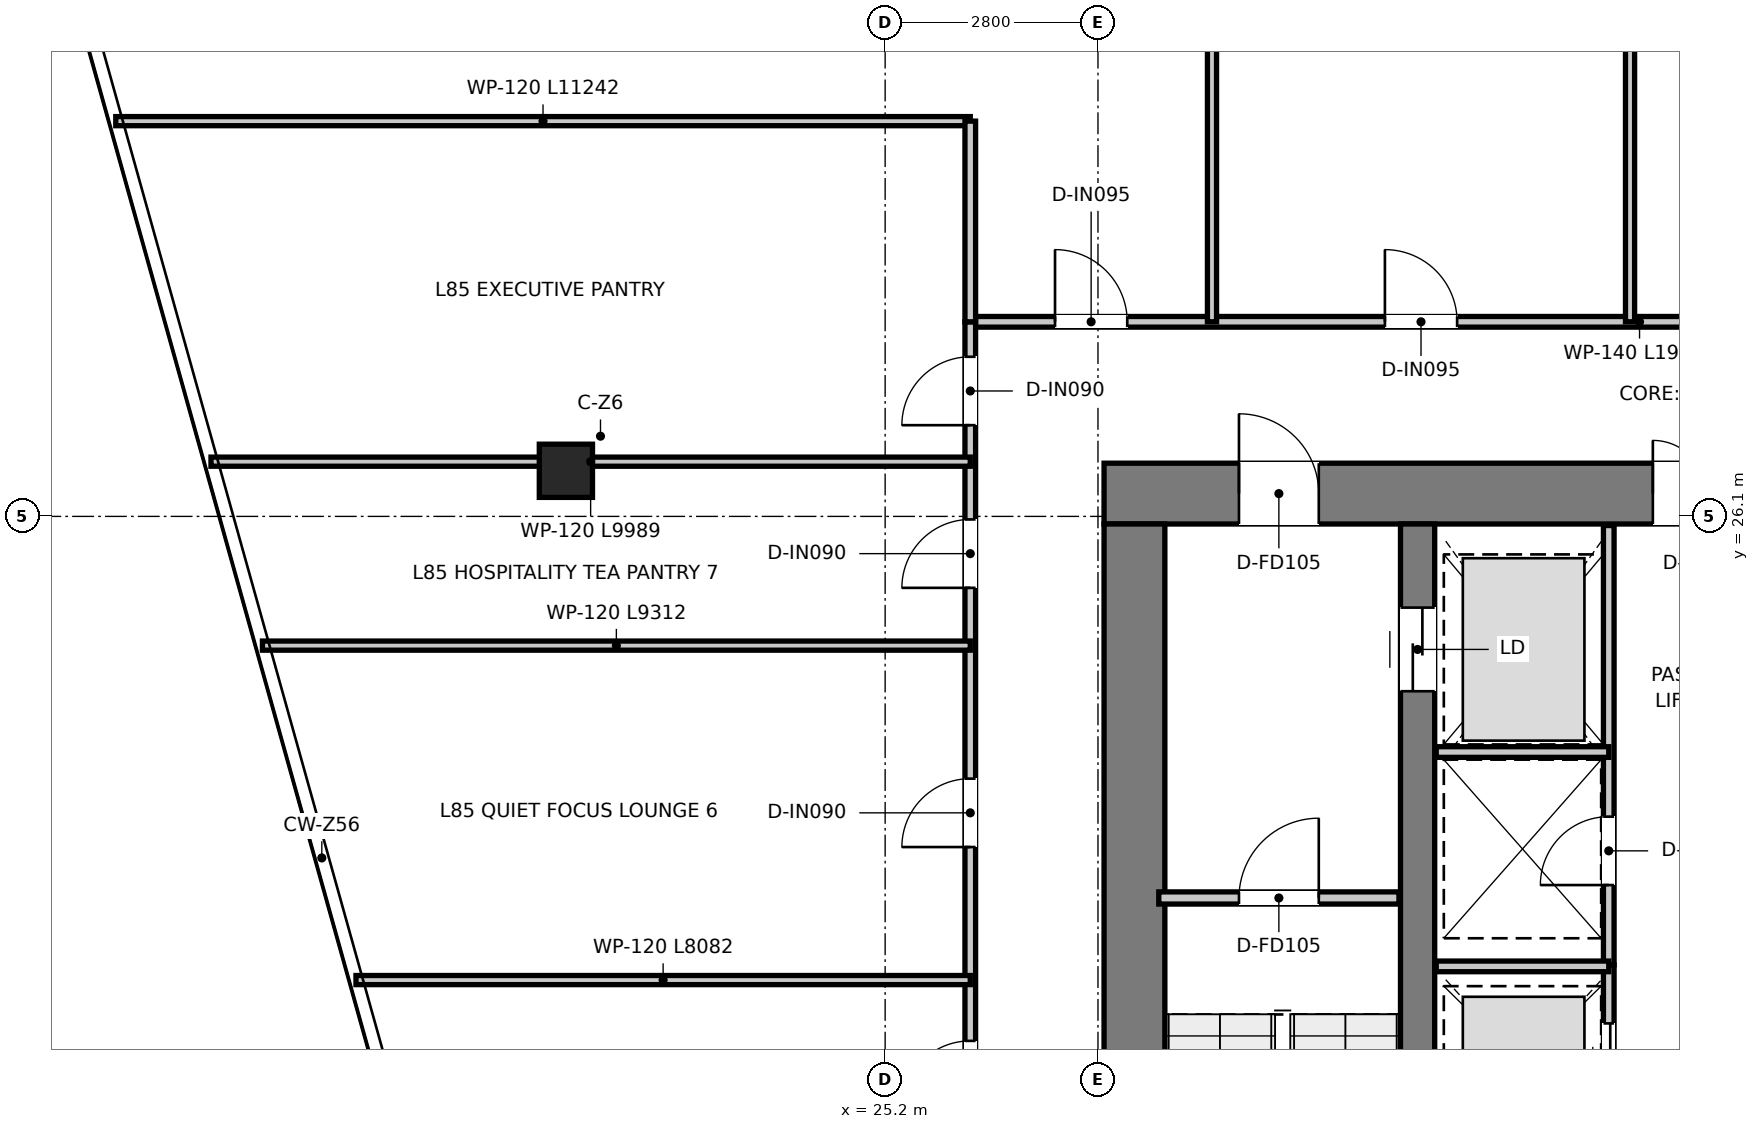
"""IFC4 building model, lengths in metres.
Left out: names, types, materials, properties, quantities, classifications, styles, units other than length and angle.
Written with IfcOpenShell. Run it as: python <this file> out.ifc"""

import sys

from ifc_helpers import new_model, si_unit, direction, frame, frame_2d, origin, origin_2d, place, context, subcontext, project, spatial, rectangle, extrude, source, transform, mapped, element, fill, save


model = new_model("IFC4")
c1 = context("Model", 3, precision=1e-05, world=origin(), true_north=direction((0.0, 1.0)))
c2 = subcontext(c1, "Body", "Model", "MODEL_VIEW")
j1 = project(units=[si_unit("LENGTHUNIT", "METRE"), si_unit("PLANEANGLEUNIT", "RADIAN")], contexts=[c1])
p1 = place(None, origin())
s1 = spatial("IfcSite", under=j1, at=p1, CompositionType="ELEMENT")
p2 = place(p1, origin())
s2 = spatial("IfcBuilding", under=s1, at=p2, CompositionType="ELEMENT")
p3 = place(p2, frame((0.0, 0.0, 347.45)))
s3 = spatial("IfcBuildingStorey", under=s2, at=p3, CompositionType="ELEMENT", Elevation=347.45)
p4 = place(p3, frame((28.08, 26.4, 0.0), z_axis=(0.0, 0.0, 1.0), x_axis=(1.0, 0.0, 0.0)))
e1 = element("IfcWall", 1, at=p4, inside=s3, PredefinedType="SHEAR", context=c2, shape_type="SweptSolid", body=[
    extrude(rectangle(XDim=15.84, YDim=0.8, at=frame_2d((7.92, 0.0))), origin(), (0.0, 0.0, 1.0), 3.95),
])
p5 = place(p4, frame((7.22, 0.0, 0.0)))
e2 = element("IfcOpeningElement", 2, at=p5, cuts=e1, PredefinedType="OPENING", context=c2, shape_type="SweptSolid", body=[
    extrude(rectangle(XDim=1.4, YDim=2.2, at=frame_2d((0.7, 1.1))), frame((0.0, 0.41, 0.0), z_axis=(0.0, -1.0, 0.0), x_axis=(1.0, 0.0, 0.0)), (0.0, 0.0, 1.0), 0.82),
])
p6 = place(p4, frame((1.775, 0.0, 0.0)))
e3 = element("IfcOpeningElement", 3, at=p6, cuts=e1, PredefinedType="OPENING", context=c2, shape_type="SweptSolid", body=[
    extrude(rectangle(XDim=1.05, YDim=2.1, at=frame_2d((0.525, 1.05))), frame((0.0, 0.41, 0.0), z_axis=(0.0, -1.0, 0.0), x_axis=(1.0, 0.0, 0.0)), (0.0, 0.0, 1.0), 0.82),
])
p7 = place(p4, frame((13.015, 0.0, 0.0)))
e4 = element("IfcOpeningElement", 4, at=p7, cuts=e1, PredefinedType="OPENING", context=c2, shape_type="SweptSolid", body=[
    extrude(rectangle(XDim=1.05, YDim=2.1, at=frame_2d((0.525, 1.05))), frame((0.0, 0.41, 0.0), z_axis=(0.0, -1.0, 0.0), x_axis=(1.0, 0.0, 0.0)), (0.0, 0.0, 1.0), 0.82),
])
p8 = place(p3, frame((28.48, 11.3, 0.0), z_axis=(0.0, 0.0, 1.0), x_axis=(0.0, 1.0, 0.0)))
e5 = element("IfcWall", 5, at=p8, inside=s3, PredefinedType="SHEAR", context=c2, shape_type="SweptSolid", body=[
    extrude(rectangle(XDim=14.7, YDim=0.8, at=frame_2d((7.35, 0.0))), origin(), (0.0, 0.0, 1.0), 3.95),
])
p9 = place(p3, frame((32.205, 13.22, 0.0), z_axis=(0.0, 0.0, 1.0), x_axis=(0.0, 1.0, 0.0)))
e6 = element("IfcWall", 6, at=p9, inside=s3, PredefinedType="SHEAR", context=c2, shape_type="SweptSolid", body=[
    extrude(rectangle(XDim=12.78, YDim=0.45, at=frame_2d((6.39, 0.0))), origin(), (0.0, 0.0, 1.0), 3.95),
])
p10 = place(p9, frame((10.58, 0.0, 0.0)))
e7 = element("IfcOpeningElement", 7, at=p10, cuts=e6, PredefinedType="OPENING", context=c2, shape_type="SweptSolid", body=[
    extrude(rectangle(XDim=1.1, YDim=2.15, at=frame_2d((0.55, 1.075))), frame((0.0, 0.235, 0.0), z_axis=(0.0, -1.0, 0.0), x_axis=(1.0, 0.0, 0.0)), (0.0, 0.0, 1.0), 0.47),
])
m1 = source(origin(), c2, "Body", "SweptSolid", [
    extrude(rectangle(XDim=0.7, YDim=0.7, at=origin_2d()), origin(), (0.0, 0.0, 1.0), 3.95),
])
p11 = place(p3, frame((21.0, 26.7, 0.0), z_axis=(0.0, 0.0, 1.0), x_axis=(1.0, 0.0, 0.0)))
e8 = element("IfcColumn", 8, at=p11, inside=s3, PredefinedType="COLUMN", context=c2, shape_type="MappedRepresentation", body=[
    mapped(m1, transform((0.0, 0.0, 0.0), x_axis=(1.0, 0.0, 0.0), y_axis=(0.0, 1.0, 0.0), z_axis=(0.0, 0.0, 1.0), scale=1.0)),
])
p12 = place(p3, frame((28.8, 21.08, 0.0), z_axis=(0.0, 0.0, 1.0), x_axis=(1.0, 0.0, 0.0)))
e9 = element("IfcWall", 9, at=p12, inside=s3, PredefinedType="PARTITIONING", context=c2, shape_type="SweptSolid", body=[
    extrude(rectangle(XDim=3.16, YDim=0.16, at=frame_2d((1.58, 0.0))), origin(), (0.0, 0.0, 1.0), 3.67),
])
p13 = place(p12, frame((1.055, 0.0, 0.0)))
e10 = element("IfcOpeningElement", 10, at=p13, cuts=e9, PredefinedType="OPENING", context=c2, shape_type="SweptSolid", body=[
    extrude(rectangle(XDim=1.05, YDim=2.1, at=frame_2d((0.525, 1.05))), frame((0.0, 0.09, 0.0), z_axis=(0.0, -1.0, 0.0), x_axis=(1.0, 0.0, 0.0)), (0.0, 0.0, 1.0), 0.18),
])
p14 = place(p3, frame((34.72, 20.2, 0.0), z_axis=(0.0, 0.0, 1.0), x_axis=(0.0, 1.0, 0.0)))
e11 = element("IfcWall", 11, at=p14, inside=s3, PredefinedType="PARTITIONING", context=c2, shape_type="SweptSolid", body=[
    extrude(rectangle(XDim=5.78, YDim=0.14, at=frame_2d((2.89, 0.0))), origin(), (0.0, 0.0, 1.0), 2.82),
])
p15 = place(p14, frame((1.05, 0.0, 0.0)))
e12 = element("IfcOpeningElement", 12, at=p15, cuts=e11, PredefinedType="OPENING", context=c2, shape_type="SweptSolid", body=[
    extrude(rectangle(XDim=0.9, YDim=2.1, at=frame_2d((0.45, 1.05))), frame((0.0, 0.08, 0.0), z_axis=(0.0, -1.0, 0.0), x_axis=(1.0, 0.0, 0.0)), (0.0, 0.0, 1.0), 0.16),
])
p16 = place(p3, frame((32.45, 23.0, 0.0), z_axis=(0.0, 0.0, 1.0), x_axis=(1.0, 0.0, 0.0)))
e13 = element("IfcWall", 13, at=p16, inside=s3, PredefinedType="PARTITIONING", context=c2, shape_type="SweptSolid", body=[
    extrude(rectangle(XDim=2.27, YDim=0.14, at=frame_2d((1.135, 0.0))), origin(), (0.0, 0.0, 1.0), 2.82),
])
p17 = place(p3, frame((34.72, 17.78, 0.0), z_axis=(0.0, 0.0, 1.0), x_axis=(0.0, 1.0, 0.0)))
e14 = element("IfcWall", 14, at=p17, inside=s3, PredefinedType="PARTITIONING", context=c2, shape_type="SweptSolid", body=[
    extrude(rectangle(XDim=2.42, YDim=0.14, at=frame_2d((1.21, 0.0))), origin(), (0.0, 0.0, 1.0), 3.67),
])
p18 = place(p17, frame((0.55, 0.0, 0.0)))
e15 = element("IfcOpeningElement", 15, at=p18, cuts=e14, PredefinedType="OPENING", context=c2, shape_type="SweptSolid", body=[
    extrude(rectangle(XDim=1.1, YDim=2.15, at=frame_2d((0.55, 1.075))), frame((0.0, 0.08, 0.0), z_axis=(0.0, -1.0, 0.0), x_axis=(1.0, 0.0, 0.0)), (0.0, 0.0, 1.0), 0.16),
])
p19 = place(p3, frame((32.45, 20.18, 0.0), z_axis=(0.0, 0.0, 1.0), x_axis=(1.0, 0.0, 0.0)))
e16 = element("IfcWall", 16, at=p19, inside=s3, PredefinedType="PARTITIONING", context=c2, shape_type="SweptSolid", body=[
    extrude(rectangle(XDim=2.27, YDim=0.14, at=frame_2d((1.135, 0.0))), origin(), (0.0, 0.0, 1.0), 3.67),
])
p20 = place(p3, frame((26.32, 28.66, 0.0), z_axis=(0.0, 0.0, 1.0), x_axis=(1.0, 0.0, 0.0)))
e17 = element("IfcWall", 17, at=p20, inside=s3, PredefinedType="PARTITIONING", context=c2, shape_type="SweptSolid", body=[
    extrude(rectangle(XDim=19.36, YDim=0.14, at=frame_2d((9.68, 0.0))), origin(), (0.0, 0.0, 1.0), 3.18),
])
p21 = place(p20, frame((1.115, 0.0, 0.0)))
e18 = element("IfcOpeningElement", 18, at=p21, cuts=e17, PredefinedType="OPENING", context=c2, shape_type="SweptSolid", body=[
    extrude(rectangle(XDim=0.95, YDim=2.1, at=frame_2d((0.475, 1.05))), frame((0.0, 0.08, 0.0), z_axis=(0.0, -1.0, 0.0), x_axis=(1.0, 0.0, 0.0)), (0.0, 0.0, 1.0), 0.16),
])
p22 = place(p20, frame((5.455, 0.0, 0.0)))
e19 = element("IfcOpeningElement", 19, at=p22, cuts=e17, PredefinedType="OPENING", context=c2, shape_type="SweptSolid", body=[
    extrude(rectangle(XDim=0.95, YDim=2.1, at=frame_2d((0.475, 1.05))), frame((0.0, 0.08, 0.0), z_axis=(0.0, -1.0, 0.0), x_axis=(1.0, 0.0, 0.0)), (0.0, 0.0, 1.0), 0.16),
])
p23 = place(p20, frame((11.205, 0.0, 0.0)))
e20 = element("IfcOpeningElement", 20, at=p23, cuts=e17, PredefinedType="OPENING", context=c2, shape_type="SweptSolid", body=[
    extrude(rectangle(XDim=0.95, YDim=2.1, at=frame_2d((0.475, 1.05))), frame((0.0, 0.08, 0.0), z_axis=(0.0, -1.0, 0.0), x_axis=(1.0, 0.0, 0.0)), (0.0, 0.0, 1.0), 0.16),
])
p24 = place(p20, frame((16.545, 0.0, 0.0)))
e21 = element("IfcOpeningElement", 21, at=p24, cuts=e17, PredefinedType="OPENING", context=c2, shape_type="SweptSolid", body=[
    extrude(rectangle(XDim=0.95, YDim=2.1, at=frame_2d((0.475, 1.05))), frame((0.0, 0.08, 0.0), z_axis=(0.0, -1.0, 0.0), x_axis=(1.0, 0.0, 0.0)), (0.0, 0.0, 1.0), 0.16),
])
p25 = place(p3, frame((26.32, 13.0, 0.0), z_axis=(0.0, 0.0, 1.0), x_axis=(0.0, 1.0, 0.0)))
e22 = element("IfcWall", 22, at=p25, inside=s3, PredefinedType="PARTITIONING", context=c2, shape_type="SweptSolid", body=[
    extrude(rectangle(XDim=15.66, YDim=0.14, at=frame_2d((7.83, 0.0))), origin(), (0.0, 0.0, 1.0), 3.13),
])
p26 = place(p25, frame((14.3, 0.0, 0.0)))
e23 = element("IfcOpeningElement", 23, at=p26, cuts=e22, PredefinedType="OPENING", context=c2, shape_type="SweptSolid", body=[
    extrude(rectangle(XDim=0.9, YDim=2.1, at=frame_2d((0.45, 1.05))), frame((0.0, 0.08, 0.0), z_axis=(0.0, -1.0, 0.0), x_axis=(1.0, 0.0, 0.0)), (0.0, 0.0, 1.0), 0.16),
])
p27 = place(p25, frame((5.3, 0.0, 0.0)))
e24 = element("IfcOpeningElement", 24, at=p27, cuts=e22, PredefinedType="OPENING", context=c2, shape_type="SweptSolid", body=[
    extrude(rectangle(XDim=0.9, YDim=2.1, at=frame_2d((0.45, 1.05))), frame((0.0, 0.08, 0.0), z_axis=(0.0, -1.0, 0.0), x_axis=(1.0, 0.0, 0.0)), (0.0, 0.0, 1.0), 0.16),
])
p28 = place(p25, frame((8.75, 0.0, 0.0)))
e25 = element("IfcOpeningElement", 25, at=p28, cuts=e22, PredefinedType="OPENING", context=c2, shape_type="SweptSolid", body=[
    extrude(rectangle(XDim=0.9, YDim=2.1, at=frame_2d((0.45, 1.05))), frame((0.0, 0.08, 0.0), z_axis=(0.0, -1.0, 0.0), x_axis=(1.0, 0.0, 0.0)), (0.0, 0.0, 1.0), 0.16),
])
p29 = place(p25, frame((12.16, 0.0, 0.0)))
e26 = element("IfcOpeningElement", 26, at=p29, cuts=e22, PredefinedType="OPENING", context=c2, shape_type="SweptSolid", body=[
    extrude(rectangle(XDim=0.9, YDim=2.1, at=frame_2d((0.45, 1.05))), frame((0.0, 0.08, 0.0), z_axis=(0.0, -1.0, 0.0), x_axis=(1.0, 0.0, 0.0)), (0.0, 0.0, 1.0), 0.16),
])
p30 = place(p3, frame((16.331, 26.82, 0.0), z_axis=(0.0, 0.0, 1.0), x_axis=(1.0, 0.0, 0.0)))
e27 = element("IfcWall", 27, at=p30, inside=s3, PredefinedType="PARTITIONING", context=c2, shape_type="SweptSolid", body=[
    extrude(rectangle(XDim=9.989, YDim=0.12, at=frame_2d((4.995, 0.0))), origin(), (0.0, 0.0, 1.0), 3.13),
])
p31 = place(p3, frame((15.078, 31.3, 0.0), z_axis=(0.0, 0.0, 1.0), x_axis=(1.0, 0.0, 0.0)))
e28 = element("IfcWall", 28, at=p31, inside=s3, PredefinedType="PARTITIONING", context=c2, shape_type="SweptSolid", body=[
    extrude(rectangle(XDim=11.242, YDim=0.12, at=frame_2d((5.621, 0.0))), origin(), (0.0, 0.0, 1.0), 3.13),
])
p32 = place(p3, frame((26.32, 28.66, 0.0), z_axis=(0.0, 0.0, 1.0), x_axis=(0.0, 1.0, 0.0)))
e29 = element("IfcWall", 29, at=p32, inside=s3, PredefinedType="PARTITIONING", context=c2, shape_type="SweptSolid", body=[
    extrude(rectangle(XDim=2.64, YDim=0.14, at=frame_2d((1.32, 0.0))), origin(), (0.0, 0.0, 1.0), 3.43),
])
p33 = place(p3, frame((29.5, 28.66, 0.0), z_axis=(0.0, 0.0, 1.0), x_axis=(0.0, 1.0, 0.0)))
e30 = element("IfcWall", 30, at=p33, inside=s3, PredefinedType="PARTITIONING", context=c2, shape_type="SweptSolid", body=[
    extrude(rectangle(XDim=15.858, YDim=0.12, at=frame_2d((7.929, 0.0))), origin(), (0.0, 0.0, 1.0), 3.13),
])
p34 = place(p3, frame((35.0, 28.66, 0.0), z_axis=(0.0, 0.0, 1.0), x_axis=(0.0, 1.0, 0.0)))
e31 = element("IfcWall", 31, at=p34, inside=s3, PredefinedType="PARTITIONING", context=c2, shape_type="SweptSolid", body=[
    extrude(rectangle(XDim=17.396, YDim=0.12, at=frame_2d((8.698, 0.0))), origin(), (0.0, 0.0, 1.0), 3.13),
])
p35 = place(p3, frame((18.238, 20.0, 0.0), z_axis=(0.0, 0.0, 1.0), x_axis=(1.0, 0.0, 0.0)))
e32 = element("IfcWall", 32, at=p35, inside=s3, PredefinedType="PARTITIONING", context=c2, shape_type="SweptSolid", body=[
    extrude(rectangle(XDim=8.082, YDim=0.12, at=frame_2d((4.041, 0.0))), origin(), (0.0, 0.0, 1.0), 3.13),
])
p36 = place(p3, frame((17.008, 24.4, 0.0), z_axis=(0.0, 0.0, 1.0), x_axis=(1.0, 0.0, 0.0)))
e33 = element("IfcWall", 33, at=p36, inside=s3, PredefinedType="PARTITIONING", context=c2, shape_type="SweptSolid", body=[
    extrude(rectangle(XDim=9.312, YDim=0.12, at=frame_2d((4.656, 0.0))), origin(), (0.0, 0.0, 1.0), 3.13),
])
p37 = place(p13, origin())
e34 = element("IfcDoor", 34, at=p37, inside=s3, OperationType="SINGLE_SWING_RIGHT", PredefinedType="DOOR", context=c2, shape_type="SweptSolid", body=[
    extrude(rectangle(XDim=1.05, YDim=2.1, at=frame_2d((0.525, 1.05))), frame((0.0, 0.025, 0.0), z_axis=(0.0, -1.0, 0.0), x_axis=(1.0, 0.0, 0.0)), (0.0, 0.0, 1.0), 0.05),
])
fill(e10, e34)
p38 = place(p5, origin())
e35 = element("IfcDoor", 35, at=p38, inside=s3, OperationType="DOUBLE_DOOR_SINGLE_SWING", PredefinedType="DOOR", context=c2, shape_type="SweptSolid", body=[
    extrude(rectangle(XDim=1.4, YDim=2.2, at=frame_2d((0.7, 1.1))), frame((0.0, 0.025, 0.0), z_axis=(0.0, -1.0, 0.0), x_axis=(1.0, 0.0, 0.0)), (0.0, 0.0, 1.0), 0.05),
])
fill(e2, e35)
p39 = place(p6, origin())
e36 = element("IfcDoor", 36, at=p39, inside=s3, OperationType="SINGLE_SWING_LEFT", PredefinedType="DOOR", context=c2, shape_type="SweptSolid", body=[
    extrude(rectangle(XDim=1.05, YDim=2.1, at=frame_2d((0.525, 1.05))), frame((0.0, 0.025, 0.0), z_axis=(0.0, -1.0, 0.0), x_axis=(1.0, 0.0, 0.0)), (0.0, 0.0, 1.0), 0.05),
])
fill(e3, e36)
p40 = place(p10, origin())
e37 = element("IfcDoor", 37, at=p40, inside=s3, OperationType="DOUBLE_DOOR_SLIDING", PredefinedType="DOOR", context=c2, shape_type="SweptSolid", body=[
    extrude(rectangle(XDim=1.1, YDim=2.15, at=frame_2d((0.55, 1.075))), frame((0.0, 0.025, 0.0), z_axis=(0.0, -1.0, 0.0), x_axis=(1.0, 0.0, 0.0)), (0.0, 0.0, 1.0), 0.05),
])
fill(e7, e37)
p41 = place(p15, origin())
e38 = element("IfcDoor", 38, at=p41, inside=s3, OperationType="SINGLE_SWING_LEFT", PredefinedType="DOOR", context=c2, shape_type="SweptSolid", body=[
    extrude(rectangle(XDim=0.9, YDim=2.1, at=frame_2d((0.45, 1.05))), frame((0.0, 0.025, 0.0), z_axis=(0.0, -1.0, 0.0), x_axis=(1.0, 0.0, 0.0)), (0.0, 0.0, 1.0), 0.05),
])
fill(e12, e38)
p42 = place(p18, origin())
e39 = element("IfcDoor", 39, at=p42, inside=s3, OperationType="DOUBLE_DOOR_SLIDING", PredefinedType="DOOR", context=c2, shape_type="SweptSolid", body=[
    extrude(rectangle(XDim=1.1, YDim=2.15, at=frame_2d((0.55, 1.075))), frame((0.0, 0.025, 0.0), z_axis=(0.0, -1.0, 0.0), x_axis=(1.0, 0.0, 0.0)), (0.0, 0.0, 1.0), 0.05),
])
fill(e15, e39)
p43 = place(p26, origin())
e40 = element("IfcDoor", 40, at=p43, inside=s3, OperationType="SINGLE_SWING_LEFT", PredefinedType="DOOR", context=c2, shape_type="SweptSolid", body=[
    extrude(rectangle(XDim=0.9, YDim=2.1, at=frame_2d((0.45, 1.05))), frame((0.0, 0.025, 0.0), z_axis=(0.0, -1.0, 0.0), x_axis=(1.0, 0.0, 0.0)), (0.0, 0.0, 1.0), 0.05),
])
fill(e23, e40)
p44 = place(p21, origin())
e41 = element("IfcDoor", 41, at=p44, inside=s3, OperationType="SINGLE_SWING_LEFT", PredefinedType="DOOR", context=c2, shape_type="SweptSolid", body=[
    extrude(rectangle(XDim=0.95, YDim=2.1, at=frame_2d((0.475, 1.05))), frame((0.0, 0.025, 0.0), z_axis=(0.0, -1.0, 0.0), x_axis=(1.0, 0.0, 0.0)), (0.0, 0.0, 1.0), 0.05),
])
fill(e18, e41)
p45 = place(p22, origin())
e42 = element("IfcDoor", 42, at=p45, inside=s3, OperationType="SINGLE_SWING_LEFT", PredefinedType="DOOR", context=c2, shape_type="SweptSolid", body=[
    extrude(rectangle(XDim=0.95, YDim=2.1, at=frame_2d((0.475, 1.05))), frame((0.0, 0.025, 0.0), z_axis=(0.0, -1.0, 0.0), x_axis=(1.0, 0.0, 0.0)), (0.0, 0.0, 1.0), 0.05),
])
fill(e19, e42)
p46 = place(p27, origin())
e43 = element("IfcDoor", 43, at=p46, inside=s3, OperationType="SINGLE_SWING_LEFT", PredefinedType="DOOR", context=c2, shape_type="SweptSolid", body=[
    extrude(rectangle(XDim=0.9, YDim=2.1, at=frame_2d((0.45, 1.05))), frame((0.0, 0.025, 0.0), z_axis=(0.0, -1.0, 0.0), x_axis=(1.0, 0.0, 0.0)), (0.0, 0.0, 1.0), 0.05),
])
fill(e24, e43)
p47 = place(p28, origin())
e44 = element("IfcDoor", 44, at=p47, inside=s3, OperationType="SINGLE_SWING_LEFT", PredefinedType="DOOR", context=c2, shape_type="SweptSolid", body=[
    extrude(rectangle(XDim=0.9, YDim=2.1, at=frame_2d((0.45, 1.05))), frame((0.0, 0.025, 0.0), z_axis=(0.0, -1.0, 0.0), x_axis=(1.0, 0.0, 0.0)), (0.0, 0.0, 1.0), 0.05),
])
fill(e25, e44)
p48 = place(p29, origin())
e45 = element("IfcDoor", 45, at=p48, inside=s3, OperationType="SINGLE_SWING_LEFT", PredefinedType="DOOR", context=c2, shape_type="SweptSolid", body=[
    extrude(rectangle(XDim=0.9, YDim=2.1, at=frame_2d((0.45, 1.05))), frame((0.0, 0.025, 0.0), z_axis=(0.0, -1.0, 0.0), x_axis=(1.0, 0.0, 0.0)), (0.0, 0.0, 1.0), 0.05),
])
fill(e26, e45)
save(model, sys.argv[1])
